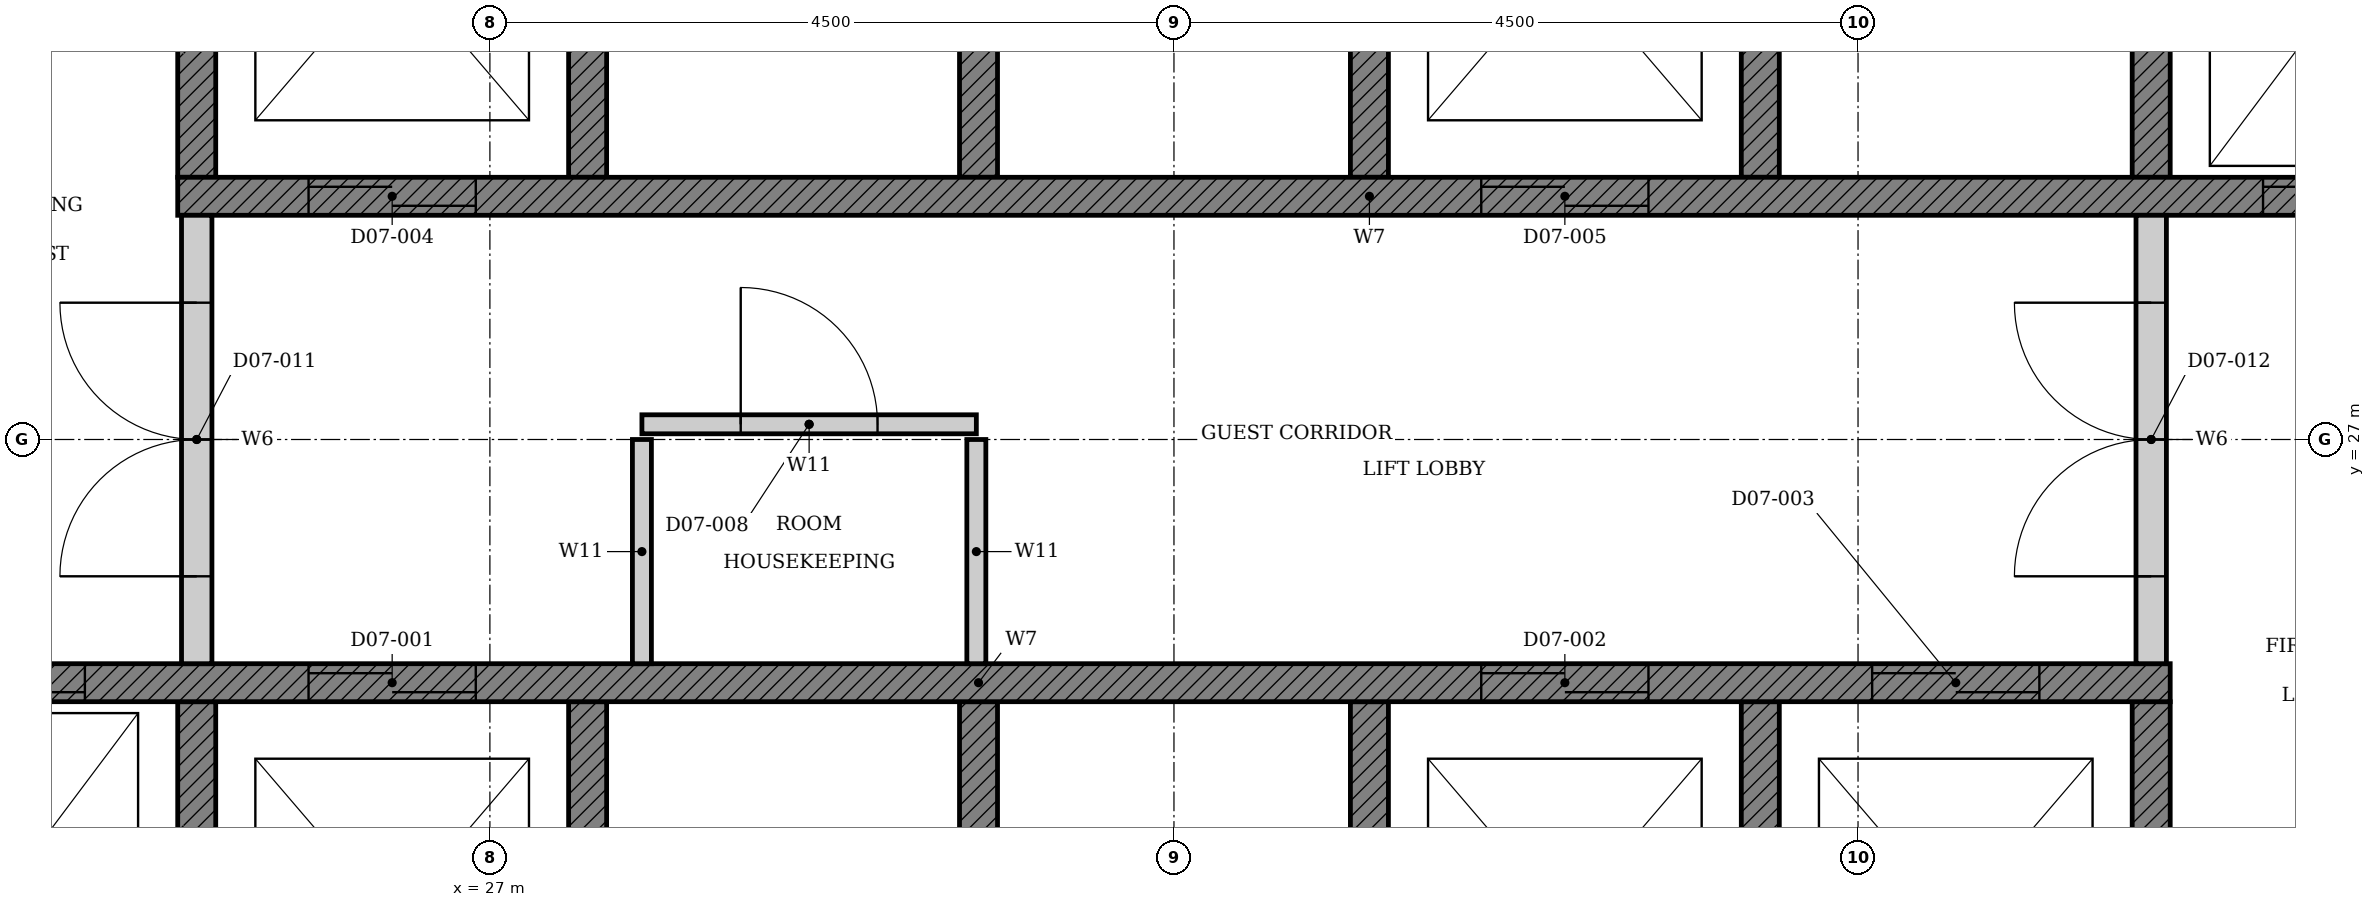
"""IFC4 building model, lengths in metres.
Left out: names, types, materials, properties, quantities, classifications, styles, units other than length and angle.
Written with IfcOpenShell. Run it as: python <this file> out.ifc"""

import sys

from ifc_helpers import new_model, si_unit, direction, frame, frame_2d, origin, place, context, subcontext, project, spatial, polyline, rectangle, outline, extrude, element, fill, save


model = new_model("IFC4")
c1 = context("Model", 3, precision=1e-05, world=origin(), true_north=direction((0.0, 1.0)))
c2 = subcontext(c1, "Body", "Model", "MODEL_VIEW")
j1 = project(units=[si_unit("LENGTHUNIT", "METRE"), si_unit("PLANEANGLEUNIT", "RADIAN")], contexts=[c1])
p1 = place(None, origin())
s1 = spatial("IfcSite", under=j1, at=p1, CompositionType="ELEMENT")
p2 = place(p1, origin())
s2 = spatial("IfcBuilding", under=s1, at=p2, CompositionType="ELEMENT")
p3 = place(p2, frame((0.0, 0.0, 37.2)))
s3 = spatial("IfcBuildingStorey", under=s2, at=p3, CompositionType="ELEMENT", Elevation=37.2)
p4 = place(p3, origin())
e1 = element("IfcWall", 1, at=p4, inside=s3, PredefinedType="SHEAR", context=c2, shape_type="SweptSolid", body=[
    extrude(outline(polyline([(22.375, 22.35), (38.053, 22.35), (38.053, 25.275), (37.803, 25.275), (37.803, 22.65), (35.482, 22.65), (35.482, 25.275), (35.232, 25.275), (35.232, 22.65), (32.911, 22.65), (32.911, 25.275), (32.661, 25.275), (32.661, 22.65), (30.339, 22.65), (30.339, 25.275), (30.089, 25.275), (30.089, 22.65), (27.768, 22.65), (27.768, 25.275), (27.518, 25.275), (27.518, 22.65), (25.197, 22.65), (25.197, 25.275), (24.947, 25.275), (24.947, 22.65), (22.625, 22.65), (22.625, 25.275), (22.375, 25.275), (22.375, 22.35)])), origin(), (0.0, 0.0, 1.0), 3.3),
])
p5 = place(p3, origin())
e2 = element("IfcWall", 2, at=p5, inside=s3, PredefinedType="SHEAR", context=c2, shape_type="SweptSolid", body=[
    extrude(outline(polyline([(24.947, 28.725), (25.197, 28.725), (25.197, 31.35), (27.518, 31.35), (27.518, 28.725), (27.768, 28.725), (27.768, 31.35), (30.089, 31.35), (30.089, 28.725), (30.339, 28.725), (30.339, 31.35), (32.661, 31.35), (32.661, 28.725), (32.911, 28.725), (32.911, 31.35), (35.232, 31.35), (35.232, 28.725), (35.482, 28.725), (35.482, 31.35), (37.803, 31.35), (37.803, 28.725), (38.053, 28.725), (38.053, 31.35), (40.375, 31.35), (40.375, 28.725), (40.625, 28.725), (40.625, 31.65), (24.947, 31.65), (24.947, 28.725)])), origin(), (0.0, 0.0, 1.0), 3.3),
])
p6 = place(p3, frame((22.375, 25.4, 0.0), z_axis=(0.0, 0.0, 1.0), x_axis=(1.0, 0.0, 0.0)))
e3 = element("IfcWall", 3, at=p6, inside=s3, PredefinedType="SHEAR", context=c2, shape_type="SweptSolid", body=[
    extrude(rectangle(XDim=15.678, YDim=0.25, at=frame_2d((7.839, 0.0))), origin(), (0.0, 0.0, 1.0), 3.3),
])
p7 = place(p6, frame((3.432, 0.0, 0.0)))
e4 = element("IfcOpeningElement", 4, at=p7, cuts=e3, PredefinedType="OPENING", context=c2, shape_type="SweptSolid", body=[
    extrude(rectangle(XDim=1.1, YDim=2.1, at=frame_2d((0.55, 1.05))), frame((0.0, 0.135, 0.0), z_axis=(0.0, -1.0, 0.0), x_axis=(1.0, 0.0, 0.0)), (0.0, 0.0, 1.0), 0.27),
])
p8 = place(p6, frame((11.146, 0.0, 0.0)))
e5 = element("IfcOpeningElement", 5, at=p8, cuts=e3, PredefinedType="OPENING", context=c2, shape_type="SweptSolid", body=[
    extrude(rectangle(XDim=1.1, YDim=2.1, at=frame_2d((0.55, 1.05))), frame((0.0, 0.135, 0.0), z_axis=(0.0, -1.0, 0.0), x_axis=(1.0, 0.0, 0.0)), (0.0, 0.0, 1.0), 0.27),
])
p9 = place(p6, frame((13.718, 0.0, 0.0)))
e6 = element("IfcOpeningElement", 6, at=p9, cuts=e3, PredefinedType="OPENING", context=c2, shape_type="SweptSolid", body=[
    extrude(rectangle(XDim=1.1, YDim=2.1, at=frame_2d((0.55, 1.05))), frame((0.0, 0.135, 0.0), z_axis=(0.0, -1.0, 0.0), x_axis=(1.0, 0.0, 0.0)), (0.0, 0.0, 1.0), 0.27),
])
p10 = place(p6, frame((0.861, 0.0, 0.0)))
e7 = element("IfcOpeningElement", 7, at=p10, cuts=e3, PredefinedType="OPENING", context=c2, shape_type="SweptSolid", body=[
    extrude(rectangle(XDim=1.1, YDim=2.1, at=frame_2d((0.55, 1.05))), frame((0.0, 0.135, 0.0), z_axis=(0.0, -1.0, 0.0), x_axis=(1.0, 0.0, 0.0)), (0.0, 0.0, 1.0), 0.27),
])
p11 = place(p3, frame((24.947, 28.6, 0.0), z_axis=(0.0, 0.0, 1.0), x_axis=(1.0, 0.0, 0.0)))
e8 = element("IfcWall", 8, at=p11, inside=s3, PredefinedType="SHEAR", context=c2, shape_type="SweptSolid", body=[
    extrude(rectangle(XDim=15.678, YDim=0.25, at=frame_2d((7.839, 0.0))), origin(), (0.0, 0.0, 1.0), 3.3),
])
p12 = place(p11, frame((0.861, 0.0, 0.0)))
e9 = element("IfcOpeningElement", 9, at=p12, cuts=e8, PredefinedType="OPENING", context=c2, shape_type="SweptSolid", body=[
    extrude(rectangle(XDim=1.1, YDim=2.1, at=frame_2d((0.55, 1.05))), frame((0.0, 0.135, 0.0), z_axis=(0.0, -1.0, 0.0), x_axis=(1.0, 0.0, 0.0)), (0.0, 0.0, 1.0), 0.27),
])
p13 = place(p11, frame((8.575, 0.0, 0.0)))
e10 = element("IfcOpeningElement", 10, at=p13, cuts=e8, PredefinedType="OPENING", context=c2, shape_type="SweptSolid", body=[
    extrude(rectangle(XDim=1.1, YDim=2.1, at=frame_2d((0.55, 1.05))), frame((0.0, 0.135, 0.0), z_axis=(0.0, -1.0, 0.0), x_axis=(1.0, 0.0, 0.0)), (0.0, 0.0, 1.0), 0.27),
])
p14 = place(p11, frame((13.718, 0.0, 0.0)))
e11 = element("IfcOpeningElement", 11, at=p14, cuts=e8, PredefinedType="OPENING", context=c2, shape_type="SweptSolid", body=[
    extrude(rectangle(XDim=1.1, YDim=2.1, at=frame_2d((0.55, 1.05))), frame((0.0, 0.135, 0.0), z_axis=(0.0, -1.0, 0.0), x_axis=(1.0, 0.0, 0.0)), (0.0, 0.0, 1.0), 0.27),
])
p15 = place(p3, frame((28.0, 27.1, 0.0), z_axis=(0.0, 0.0, 1.0), x_axis=(1.0, 0.0, 0.0)))
e12 = element("IfcWall", 12, at=p15, inside=s3, PredefinedType="PARTITIONING", context=c2, shape_type="SweptSolid", body=[
    extrude(rectangle(XDim=2.2, YDim=0.125, at=frame_2d((1.1, 0.0))), origin(), (0.0, 0.0, 1.0), 3.3),
])
p16 = place(p15, frame((0.65, 0.0, 0.0)))
e13 = element("IfcOpeningElement", 13, at=p16, cuts=e12, PredefinedType="OPENING", context=c2, shape_type="SweptSolid", body=[
    extrude(rectangle(XDim=0.9, YDim=2.1, at=frame_2d((0.45, 1.05))), frame((0.0, 0.073, 0.0), z_axis=(0.0, -1.0, 0.0), x_axis=(1.0, 0.0, 0.0)), (0.0, 0.0, 1.0), 0.145),
])
for number, where, z_axis, x_axis in (
    (14, (28.0, 25.525, 0.0), (0.0, 0.0, 1.0), (0.0, 1.0, 0.0)),
    (15, (30.2, 25.525, 0.0), (0.0, 0.0, 1.0), (0.0, 1.0, 0.0)),
):
    element("IfcWall", number, at=place(p3, frame(where, z_axis=z_axis, x_axis=x_axis)), inside=s3, PredefinedType="PARTITIONING", context=c2, shape_type="SweptSolid", body=[
        extrude(rectangle(XDim=1.475, YDim=0.125, at=frame_2d((0.738, 0.0))), origin(), (0.0, 0.0, 1.0), 3.3),
    ])
p17 = place(p3, frame((25.072, 25.525, 0.0), z_axis=(0.0, 0.0, 1.0), x_axis=(0.0, 1.0, 0.0)))
e16 = element("IfcWall", 16, at=p17, inside=s3, PredefinedType="PARTITIONING", context=c2, shape_type="SweptSolid", body=[
    extrude(rectangle(XDim=2.95, YDim=0.2, at=frame_2d((1.475, 0.0))), origin(), (0.0, 0.0, 1.0), 3.3),
])
p18 = place(p17, frame((0.575, 0.0, 0.0)))
e17 = element("IfcOpeningElement", 17, at=p18, cuts=e16, PredefinedType="OPENING", context=c2, shape_type="SweptSolid", body=[
    extrude(rectangle(XDim=1.8, YDim=2.1, at=frame_2d((0.9, 1.05))), frame((0.0, 0.11, 0.0), z_axis=(0.0, -1.0, 0.0), x_axis=(1.0, 0.0, 0.0)), (0.0, 0.0, 1.0), 0.22),
])
p19 = place(p3, frame((37.928, 25.525, 0.0), z_axis=(0.0, 0.0, 1.0), x_axis=(0.0, 1.0, 0.0)))
e18 = element("IfcWall", 18, at=p19, inside=s3, PredefinedType="PARTITIONING", context=c2, shape_type="SweptSolid", body=[
    extrude(rectangle(XDim=2.95, YDim=0.2, at=frame_2d((1.475, 0.0))), origin(), (0.0, 0.0, 1.0), 3.3),
])
p20 = place(p19, frame((0.575, 0.0, 0.0)))
e19 = element("IfcOpeningElement", 19, at=p20, cuts=e18, PredefinedType="OPENING", context=c2, shape_type="SweptSolid", body=[
    extrude(rectangle(XDim=1.8, YDim=2.1, at=frame_2d((0.9, 1.05))), frame((0.0, 0.11, 0.0), z_axis=(0.0, -1.0, 0.0), x_axis=(1.0, 0.0, 0.0)), (0.0, 0.0, 1.0), 0.22),
])
p21 = place(p7, origin())
e20 = element("IfcDoor", 20, at=p21, inside=s3, OperationType="DOUBLE_DOOR_SLIDING", PredefinedType="DOOR", context=c2, shape_type="SweptSolid", body=[
    extrude(rectangle(XDim=1.1, YDim=2.1, at=frame_2d((0.55, 1.05))), frame((0.0, 0.025, 0.0), z_axis=(0.0, -1.0, 0.0), x_axis=(1.0, 0.0, 0.0)), (0.0, 0.0, 1.0), 0.05),
])
fill(e4, e20)
p22 = place(p8, origin())
e21 = element("IfcDoor", 21, at=p22, inside=s3, OperationType="DOUBLE_DOOR_SLIDING", PredefinedType="DOOR", context=c2, shape_type="SweptSolid", body=[
    extrude(rectangle(XDim=1.1, YDim=2.1, at=frame_2d((0.55, 1.05))), frame((0.0, 0.025, 0.0), z_axis=(0.0, -1.0, 0.0), x_axis=(1.0, 0.0, 0.0)), (0.0, 0.0, 1.0), 0.05),
])
fill(e5, e21)
p23 = place(p9, origin())
e22 = element("IfcDoor", 22, at=p23, inside=s3, OperationType="DOUBLE_DOOR_SLIDING", PredefinedType="DOOR", context=c2, shape_type="SweptSolid", body=[
    extrude(rectangle(XDim=1.1, YDim=2.1, at=frame_2d((0.55, 1.05))), frame((0.0, 0.025, 0.0), z_axis=(0.0, -1.0, 0.0), x_axis=(1.0, 0.0, 0.0)), (0.0, 0.0, 1.0), 0.05),
])
fill(e6, e22)
p24 = place(p12, origin())
e23 = element("IfcDoor", 23, at=p24, inside=s3, OperationType="DOUBLE_DOOR_SLIDING", PredefinedType="DOOR", context=c2, shape_type="SweptSolid", body=[
    extrude(rectangle(XDim=1.1, YDim=2.1, at=frame_2d((0.55, 1.05))), frame((0.0, 0.025, 0.0), z_axis=(0.0, -1.0, 0.0), x_axis=(1.0, 0.0, 0.0)), (0.0, 0.0, 1.0), 0.05),
])
fill(e9, e23)
p25 = place(p13, origin())
e24 = element("IfcDoor", 24, at=p25, inside=s3, OperationType="DOUBLE_DOOR_SLIDING", PredefinedType="DOOR", context=c2, shape_type="SweptSolid", body=[
    extrude(rectangle(XDim=1.1, YDim=2.1, at=frame_2d((0.55, 1.05))), frame((0.0, 0.025, 0.0), z_axis=(0.0, -1.0, 0.0), x_axis=(1.0, 0.0, 0.0)), (0.0, 0.0, 1.0), 0.05),
])
fill(e10, e24)
p26 = place(p10, origin())
e25 = element("IfcDoor", 25, at=p26, inside=s3, OperationType="DOUBLE_DOOR_SLIDING", PredefinedType="DOOR", context=c2, shape_type="SweptSolid", body=[
    extrude(rectangle(XDim=1.1, YDim=2.1, at=frame_2d((0.55, 1.05))), frame((0.0, 0.025, 0.0), z_axis=(0.0, -1.0, 0.0), x_axis=(1.0, 0.0, 0.0)), (0.0, 0.0, 1.0), 0.05),
])
fill(e7, e25)
p27 = place(p14, origin())
e26 = element("IfcDoor", 26, at=p27, inside=s3, OperationType="DOUBLE_DOOR_SLIDING", PredefinedType="DOOR", context=c2, shape_type="SweptSolid", body=[
    extrude(rectangle(XDim=1.1, YDim=2.1, at=frame_2d((0.55, 1.05))), frame((0.0, 0.025, 0.0), z_axis=(0.0, -1.0, 0.0), x_axis=(1.0, 0.0, 0.0)), (0.0, 0.0, 1.0), 0.05),
])
fill(e11, e26)
p28 = place(p16, origin())
e27 = element("IfcDoor", 27, at=p28, inside=s3, OperationType="SINGLE_SWING_LEFT", PredefinedType="DOOR", context=c2, shape_type="SweptSolid", body=[
    extrude(rectangle(XDim=0.9, YDim=2.1, at=frame_2d((0.45, 1.05))), frame((0.0, 0.025, 0.0), z_axis=(0.0, -1.0, 0.0), x_axis=(1.0, 0.0, 0.0)), (0.0, 0.0, 1.0), 0.05),
])
fill(e13, e27)
p29 = place(p18, origin())
e28 = element("IfcDoor", 28, at=p29, inside=s3, OperationType="DOUBLE_DOOR_SINGLE_SWING", PredefinedType="DOOR", context=c2, shape_type="SweptSolid", body=[
    extrude(rectangle(XDim=1.8, YDim=2.1, at=frame_2d((0.9, 1.05))), frame((0.0, 0.025, 0.0), z_axis=(0.0, -1.0, 0.0), x_axis=(1.0, 0.0, 0.0)), (0.0, 0.0, 1.0), 0.05),
])
fill(e17, e28)
p30 = place(p20, origin())
e29 = element("IfcDoor", 29, at=p30, inside=s3, OperationType="DOUBLE_DOOR_SINGLE_SWING", PredefinedType="DOOR", context=c2, shape_type="SweptSolid", body=[
    extrude(rectangle(XDim=1.8, YDim=2.1, at=frame_2d((0.9, 1.05))), frame((0.0, 0.025, 0.0), z_axis=(0.0, -1.0, 0.0), x_axis=(1.0, 0.0, 0.0)), (0.0, 0.0, 1.0), 0.05),
])
fill(e19, e29)
save(model, sys.argv[1])
